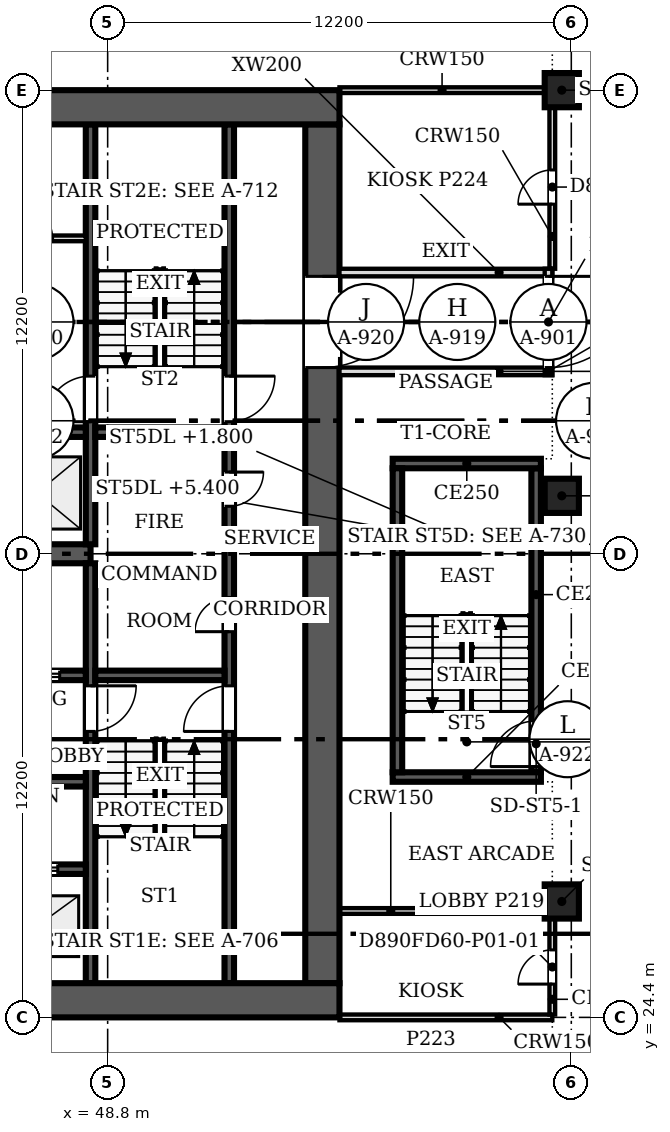
"""IFC4 building model, lengths in metres.
Left out: names, types, materials, properties, quantities, classifications, styles, units other than length and angle.
Written with IfcOpenShell. Run it as: python <this file> out.ifc"""

import sys

from ifc_helpers import new_model, si_unit, direction, frame, frame_2d, origin, origin_2d, place, context, subcontext, project, spatial, rectangle, extrude, source, transform, mapped, element, fill, save


model = new_model("IFC4")
c1 = context("Model", 3, precision=1e-05, world=origin(), true_north=direction((0.0, 1.0)))
c2 = subcontext(c1, "Body", "Model", "MODEL_VIEW")
j1 = project(units=[si_unit("LENGTHUNIT", "METRE"), si_unit("PLANEANGLEUNIT", "RADIAN")], contexts=[c1])
p1 = place(None, origin())
s1 = spatial("IfcSite", under=j1, at=p1, CompositionType="ELEMENT")
p2 = place(p1, origin())
s2 = spatial("IfcBuilding", under=s1, at=p2, CompositionType="ELEMENT")
p3 = place(p2, origin())
s3 = spatial("IfcBuildingStorey", under=s2, at=p3, CompositionType="ELEMENT", Elevation=0.0)
for number, where, z_axis, x_axis in (
    (1, (60.75, 27.45, 0.0), (0.0, 0.0, 1.0), (1.0, 0.0, 0.0)),
    (2, (60.75, 38.125, 0.0), (0.0, 0.0, 1.0), (1.0, 0.0, 0.0)),
    (3, (60.75, 48.8, 0.0), (0.0, 0.0, 1.0), (1.0, 0.0, 0.0)),
):
    element("IfcColumn", number, at=place(p3, frame(where, z_axis=z_axis, x_axis=x_axis)), inside=s3, PredefinedType="COLUMN", context=c2, shape_type="SweptSolid", body=[
        extrude(rectangle(XDim=0.9, YDim=0.9, at=origin_2d()), origin(), (0.0, 0.0, 1.0), 6.95),
    ])
for number, where, z_axis, x_axis in (
    (4, (54.9, 24.85, 0.0), (0.0, 0.0, 1.0), (-1.0, 0.0, 0.0)),
    (5, (30.5, 48.35, 0.0), (0.0, 0.0, 1.0), (1.0, 0.0, 0.0)),
):
    element("IfcWall", number, at=place(p3, frame(where, z_axis=z_axis, x_axis=x_axis)), inside=s3, PredefinedType="SHEAR", context=c2, shape_type="SweptSolid", body=[
        extrude(rectangle(XDim=24.4, YDim=0.9, at=frame_2d((12.2, 0.0))), origin(), (0.0, 0.0, 1.0), 7.2),
    ])
p4 = place(p3, frame((54.45, 47.9, 0.0), z_axis=(0.0, 0.0, 1.0), x_axis=(0.0, -1.0, 0.0)))
e6 = element("IfcWall", 6, at=p4, inside=s3, PredefinedType="SHEAR", context=c2, shape_type="SweptSolid", body=[
    extrude(rectangle(XDim=22.6, YDim=0.9, at=frame_2d((11.3, 0.0))), origin(), (0.0, 0.0, 1.0), 7.2),
])
m1 = source(origin(), c2, "Body", "SweptSolid", [
    extrude(rectangle(XDim=2.4, YDim=2.1, at=frame_2d((1.2, 1.05))), frame((0.0, 0.46, 0.0), z_axis=(0.0, -1.0, 0.0), x_axis=(1.0, 0.0, 0.0)), (0.0, 0.0, 1.0), 0.92),
])
p5 = place(p4, frame((4.0, 0.0, 0.0)))
e7 = element("IfcOpeningElement", 7, at=p5, cuts=e6, PredefinedType="OPENING", context=c2, shape_type="MappedRepresentation", body=[
    mapped(m1, transform((0.0, 0.0, 0.0), scale=1.0)),
])
p6 = place(p3, frame((31.4, 36.6, 0.0), z_axis=(0.0, 0.0, 1.0), x_axis=(1.0, 0.0, 0.0)))
e8 = element("IfcWall", 8, at=p6, inside=s3, PredefinedType="SHEAR", context=c2, shape_type="SweptSolid", body=[
    extrude(rectangle(XDim=16.95, YDim=0.5, at=frame_2d((8.475, 0.0))), origin(), (0.0, 0.0, 1.0), 7.2),
])
p7 = place(p3, frame((48.35, 36.35, 0.0), z_axis=(0.0, 0.0, 1.0), x_axis=(0.0, -1.0, 0.0)))
e9 = element("IfcWall", 9, at=p7, inside=s3, PredefinedType="SOLIDWALL", context=c2, shape_type="SweptSolid", body=[
    extrude(rectangle(XDim=11.05, YDim=0.25, at=frame_2d((5.525, 0.0))), origin(), (0.0, 0.0, 1.0), 7.2),
])
m2 = source(origin(), c2, "Body", "SweptSolid", [
    extrude(rectangle(XDim=1.2, YDim=2.1, at=frame_2d((0.6, 1.05))), frame((0.0, 0.135, 0.0), z_axis=(0.0, -1.0, 0.0), x_axis=(1.0, 0.0, 0.0)), (0.0, 0.0, 1.0), 0.27),
])
p8 = place(p7, frame((3.225, 0.0, 0.0)))
e10 = element("IfcOpeningElement", 10, at=p8, cuts=e9, PredefinedType="OPENING", context=c2, shape_type="MappedRepresentation", body=[
    mapped(m2, transform((0.0, 0.0, 0.0), scale=1.0)),
])
p9 = place(p3, frame((48.35, 47.9, 0.0), z_axis=(0.0, 0.0, 1.0), x_axis=(0.0, -1.0, 0.0)))
e11 = element("IfcWall", 11, at=p9, inside=s3, PredefinedType="SOLIDWALL", context=c2, shape_type="SweptSolid", body=[
    extrude(rectangle(XDim=11.05, YDim=0.25, at=frame_2d((5.525, 0.0))), origin(), (0.0, 0.0, 1.0), 7.2),
])
p10 = place(p9, frame((6.625, 0.0, 0.0)))
e12 = element("IfcOpeningElement", 12, at=p10, cuts=e11, PredefinedType="OPENING", context=c2, shape_type="MappedRepresentation", body=[
    mapped(m2, transform((0.0, 0.0, 0.0), scale=1.0)),
])
p11 = place(p3, frame((52.0, 25.3, 0.0), z_axis=(0.0, 0.0, 1.0), x_axis=(0.0, 1.0, 0.0)))
e13 = element("IfcWall", 13, at=p11, inside=s3, PredefinedType="SOLIDWALL", context=c2, shape_type="SweptSolid", body=[
    extrude(rectangle(XDim=22.6, YDim=0.25, at=frame_2d((11.3, 0.0))), origin(), (0.0, 0.0, 1.0), 7.2),
])
p12 = place(p11, frame((6.625, 0.0, 0.0)))
e14 = element("IfcOpeningElement", 14, at=p12, cuts=e13, PredefinedType="OPENING", context=c2, shape_type="MappedRepresentation", body=[
    mapped(m2, transform((0.0, 0.0, 0.0), scale=1.0)),
])
m3 = source(origin(), c2, "Body", "SweptSolid", [
    extrude(rectangle(XDim=0.9, YDim=2.1, at=frame_2d((0.45, 1.05))), frame((0.0, 0.135, 0.0), z_axis=(0.0, -1.0, 0.0), x_axis=(1.0, 0.0, 0.0)), (0.0, 0.0, 1.0), 0.27),
])
p13 = place(p11, frame((9.25, 0.0, 0.0)))
e15 = element("IfcOpeningElement", 15, at=p13, cuts=e13, PredefinedType="OPENING", context=c2, shape_type="MappedRepresentation", body=[
    mapped(m3, transform((0.0, 0.0, 0.0), scale=1.0)),
])
p14 = place(p11, frame((12.55, 0.0, 0.0)))
e16 = element("IfcOpeningElement", 16, at=p14, cuts=e13, PredefinedType="OPENING", context=c2, shape_type="MappedRepresentation", body=[
    mapped(m3, transform((0.0, 0.0, 0.0), scale=1.0)),
])
p15 = place(p11, frame((14.775, 0.0, 0.0)))
e17 = element("IfcOpeningElement", 17, at=p15, cuts=e13, PredefinedType="OPENING", context=c2, shape_type="MappedRepresentation", body=[
    mapped(m2, transform((0.0, 0.0, 0.0), scale=1.0)),
])
p16 = place(p3, frame((48.225, 33.4, 0.0), z_axis=(0.0, 0.0, 1.0), x_axis=(-1.0, 0.0, 0.0)))
e18 = element("IfcWall", 18, at=p16, inside=s3, PredefinedType="SOLIDWALL", context=c2, shape_type="SweptSolid", body=[
    extrude(rectangle(XDim=5.275, YDim=0.25, at=frame_2d((2.638, 0.0))), origin(), (0.0, 0.0, 1.0), 7.2),
])
p17 = place(p16, frame((3.512, 0.0, 0.0)))
e19 = element("IfcOpeningElement", 19, at=p17, cuts=e18, PredefinedType="OPENING", context=c2, shape_type="MappedRepresentation", body=[
    mapped(m2, transform((0.0, 0.0, 0.0), scale=1.0)),
])
p18 = place(p16, frame((0.688, 0.0, 0.0)))
e20 = element("IfcOpeningElement", 20, at=p18, cuts=e18, PredefinedType="OPENING", context=c2, shape_type="MappedRepresentation", body=[
    mapped(m2, transform((0.0, 0.0, 0.0), scale=1.0)),
])
p19 = place(p3, frame((48.475, 33.4, 0.0), z_axis=(0.0, 0.0, 1.0), x_axis=(1.0, 0.0, 0.0)))
e21 = element("IfcWall", 21, at=p19, inside=s3, PredefinedType="SOLIDWALL", context=c2, shape_type="SweptSolid", body=[
    extrude(rectangle(XDim=3.4, YDim=0.25, at=frame_2d((1.7, 0.0))), origin(), (0.0, 0.0, 1.0), 7.2),
])
p20 = place(p3, frame((42.95, 28.3, 0.0), z_axis=(0.0, 0.0, 1.0), x_axis=(1.0, 0.0, 0.0)))
e22 = element("IfcWall", 22, at=p20, inside=s3, PredefinedType="SOLIDWALL", context=c2, shape_type="SweptSolid", body=[
    extrude(rectangle(XDim=5.275, YDim=0.25, at=frame_2d((2.638, 0.0))), origin(), (0.0, 0.0, 1.0), 7.2),
])
m4 = source(origin(), c2, "Body", "SweptSolid", [
    extrude(rectangle(XDim=1.1, YDim=2.1, at=frame_2d((0.55, 1.05))), frame((0.0, 0.135, 0.0), z_axis=(0.0, -1.0, 0.0), x_axis=(1.0, 0.0, 0.0)), (0.0, 0.0, 1.0), 0.27),
])
p21 = place(p20, frame((0.613, 0.0, 0.0)))
e23 = element("IfcOpeningElement", 23, at=p21, cuts=e22, PredefinedType="OPENING", context=c2, shape_type="MappedRepresentation", body=[
    mapped(m4, transform((0.0, 0.0, 0.0), scale=1.0)),
])
p22 = place(p20, frame((3.438, 0.0, 0.0)))
e24 = element("IfcOpeningElement", 24, at=p22, cuts=e22, PredefinedType="OPENING", context=c2, shape_type="MappedRepresentation", body=[
    mapped(m4, transform((0.0, 0.0, 0.0), scale=1.0)),
])
p23 = place(p3, frame((42.95, 39.8, 0.0), z_axis=(0.0, 0.0, 1.0), x_axis=(1.0, 0.0, 0.0)))
e25 = element("IfcWall", 25, at=p23, inside=s3, PredefinedType="SOLIDWALL", context=c2, shape_type="SweptSolid", body=[
    extrude(rectangle(XDim=5.275, YDim=0.25, at=frame_2d((2.638, 0.0))), origin(), (0.0, 0.0, 1.0), 7.2),
])
p24 = place(p23, frame((0.613, 0.0, 0.0)))
e26 = element("IfcOpeningElement", 26, at=p24, cuts=e25, PredefinedType="OPENING", context=c2, shape_type="MappedRepresentation", body=[
    mapped(m4, transform((0.0, 0.0, 0.0), scale=1.0)),
])
p25 = place(p23, frame((3.438, 0.0, 0.0)))
e27 = element("IfcOpeningElement", 27, at=p25, cuts=e25, PredefinedType="OPENING", context=c2, shape_type="MappedRepresentation", body=[
    mapped(m4, transform((0.0, 0.0, 0.0), scale=1.0)),
])
p26 = place(p3, frame((48.475, 39.8, 0.0), z_axis=(0.0, 0.0, 1.0), x_axis=(1.0, 0.0, 0.0)))
e28 = element("IfcWall", 28, at=p26, inside=s3, PredefinedType="SOLIDWALL", context=c2, shape_type="SweptSolid", body=[
    extrude(rectangle(XDim=3.4, YDim=0.25, at=frame_2d((1.7, 0.0))), origin(), (0.0, 0.0, 1.0), 7.2),
])
p27 = place(p3, frame((42.95, 30.6, 0.0), z_axis=(0.0, 0.0, 1.0), x_axis=(1.0, 0.0, 0.0)))
e29 = element("IfcWall", 29, at=p27, inside=s3, PredefinedType="SOLIDWALL", context=c2, shape_type="SweptSolid", body=[
    extrude(rectangle(XDim=5.275, YDim=0.25, at=frame_2d((2.638, 0.0))), origin(), (0.0, 0.0, 1.0), 7.2),
])
p28 = place(p3, frame((45.65, 44.9, 0.0), z_axis=(0.0, 0.0, 1.0), x_axis=(1.0, 0.0, 0.0)))
e30 = element("IfcWall", 30, at=p28, inside=s3, PredefinedType="PARTITIONING", context=c2, shape_type="SweptSolid", body=[
    extrude(rectangle(XDim=2.575, YDim=0.15, at=frame_2d((1.288, 0.0))), origin(), (0.0, 0.0, 1.0), 6.95),
])
m5 = source(origin(), c2, "Body", "SweptSolid", [
    extrude(rectangle(XDim=0.9, YDim=2.1, at=frame_2d((0.45, 1.05))), frame((0.0, 0.085, 0.0), z_axis=(0.0, -1.0, 0.0), x_axis=(1.0, 0.0, 0.0)), (0.0, 0.0, 1.0), 0.17),
])
p29 = place(p28, frame((0.8, 0.0, 0.0)))
e31 = element("IfcOpeningElement", 31, at=p29, cuts=e30, PredefinedType="OPENING", context=c2, shape_type="MappedRepresentation", body=[
    mapped(m5, transform((0.0, 0.0, 0.0), scale=1.0)),
])
p30 = place(p3, frame((60.2, 30.725, 0.0), z_axis=(0.0, 0.0, 1.0), x_axis=(-1.0, 0.0, 0.0)))
e32 = element("IfcWall", 32, at=p30, inside=s3, PredefinedType="SOLIDWALL", context=c2, shape_type="SweptSolid", body=[
    extrude(rectangle(XDim=3.9, YDim=0.25, at=frame_2d((1.95, 0.0))), origin(), (0.0, 0.0, 1.0), 7.2),
])
p31 = place(p3, frame((56.425, 30.85, 0.0), z_axis=(0.0, 0.0, 1.0), x_axis=(0.0, 1.0, 0.0)))
e33 = element("IfcWall", 33, at=p31, inside=s3, PredefinedType="SOLIDWALL", context=c2, shape_type="SweptSolid", body=[
    extrude(rectangle(XDim=8.0, YDim=0.25, at=frame_2d((4.0, 0.0))), origin(), (0.0, 0.0, 1.0), 7.2),
])
p32 = place(p3, frame((56.3, 38.975, 0.0), z_axis=(0.0, 0.0, 1.0), x_axis=(1.0, 0.0, 0.0)))
e34 = element("IfcWall", 34, at=p32, inside=s3, PredefinedType="SOLIDWALL", context=c2, shape_type="SweptSolid", body=[
    extrude(rectangle(XDim=3.9, YDim=0.25, at=frame_2d((1.95, 0.0))), origin(), (0.0, 0.0, 1.0), 7.2),
])
p33 = place(p3, frame((60.075, 38.85, 0.0), z_axis=(0.0, 0.0, 1.0), x_axis=(0.0, -1.0, 0.0)))
e35 = element("IfcWall", 35, at=p33, inside=s3, PredefinedType="SOLIDWALL", context=c2, shape_type="SweptSolid", body=[
    extrude(rectangle(XDim=8.0, YDim=0.25, at=frame_2d((4.0, 0.0))), origin(), (0.0, 0.0, 1.0), 7.2),
])
p34 = place(p33, frame((6.65, 0.0, 0.0)))
e36 = element("IfcOpeningElement", 36, at=p34, cuts=e35, PredefinedType="OPENING", context=c2, shape_type="MappedRepresentation", body=[
    mapped(m2, transform((0.0, 0.0, 0.0), scale=1.0)),
])
for number, where, z_axis, x_axis in (
    (37, (54.9, 41.4, 0.0), (0.0, 0.0, 1.0), (1.0, 0.0, 0.0)),
    (38, (54.9, 44.0, 0.0), (0.0, 0.0, 1.0), (1.0, 0.0, 0.0)),
):
    element("IfcWall", number, at=place(p3, frame(where, z_axis=z_axis, x_axis=x_axis)), inside=s3, PredefinedType="PARTITIONING", context=c2, shape_type="SweptSolid", body=[
        extrude(rectangle(XDim=5.6, YDim=0.2, at=frame_2d((2.8, 0.0))), origin(), (0.0, 0.0, 1.0), 6.115),
    ])
p35 = place(p3, frame((60.4, 44.1, 0.0), z_axis=(0.0, 0.0, 1.0), x_axis=(0.0, -1.0, 0.0)))
e39 = element("IfcWall", 39, at=p35, inside=s3, PredefinedType="PARTITIONING", context=c2, shape_type="SweptSolid", body=[
    extrude(rectangle(XDim=2.8, YDim=0.2, at=frame_2d((1.4, 0.0))), origin(), (0.0, 0.0, 1.0), 6.115),
])
m6 = source(origin(), c2, "Body", "SweptSolid", [
    extrude(rectangle(XDim=2.4, YDim=2.1, at=frame_2d((1.2, 1.05))), frame((0.0, 0.11, 0.0), z_axis=(0.0, -1.0, 0.0), x_axis=(1.0, 0.0, 0.0)), (0.0, 0.0, 1.0), 0.22),
])
p36 = place(p35, frame((0.2, 0.0, 0.0)))
e40 = element("IfcOpeningElement", 40, at=p36, cuts=e39, PredefinedType="OPENING", context=c2, shape_type="MappedRepresentation", body=[
    mapped(m6, transform((0.0, 0.0, 0.0), scale=1.0)),
])
p37 = place(p3, frame((54.9, 24.4, 0.0), z_axis=(0.0, 0.0, 1.0), x_axis=(1.0, 0.0, 0.0)))
e41 = element("IfcWall", 41, at=p37, inside=s3, PredefinedType="PARTITIONING", context=c2, shape_type="SweptSolid", body=[
    extrude(rectangle(XDim=5.6, YDim=0.15, at=frame_2d((2.8, 0.0))), origin(), (0.0, 0.0, 1.0), 6.115),
])
p38 = place(p3, frame((60.5, 24.476, 0.0), z_axis=(0.0, 0.0, 1.0), x_axis=(0.0, 1.0, 0.0)))
e42 = element("IfcWall", 42, at=p38, inside=s3, PredefinedType="PARTITIONING", context=c2, shape_type="SweptSolid", body=[
    extrude(rectangle(XDim=2.523, YDim=0.15, at=frame_2d((1.261, 0.0))), origin(), (0.0, 0.0, 1.0), 6.115),
])
p39 = place(p38, frame((0.8, 0.0, 0.0)))
e43 = element("IfcOpeningElement", 43, at=p39, cuts=e42, PredefinedType="OPENING", context=c2, shape_type="MappedRepresentation", body=[
    mapped(m5, transform((0.0, 0.0, 0.0), scale=1.0)),
])
p40 = place(p3, frame((54.9, 27.2, 0.0), z_axis=(0.0, 0.0, 1.0), x_axis=(1.0, 0.0, 0.0)))
e44 = element("IfcWall", 44, at=p40, inside=s3, PredefinedType="PARTITIONING", context=c2, shape_type="SweptSolid", body=[
    extrude(rectangle(XDim=5.399, YDim=0.15, at=frame_2d((2.7, 0.0))), origin(), (0.0, 0.0, 1.0), 6.115),
])
p41 = place(p3, frame((60.5, 44.1, 0.0), z_axis=(0.0, 0.0, 1.0), x_axis=(0.0, 1.0, 0.0)))
e45 = element("IfcWall", 45, at=p41, inside=s3, PredefinedType="PARTITIONING", context=c2, shape_type="SweptSolid", body=[
    extrude(rectangle(XDim=4.249, YDim=0.15, at=frame_2d((2.125, 0.0))), origin(), (0.0, 0.0, 1.0), 6.115),
])
p42 = place(p41, frame((1.7, 0.0, 0.0)))
e46 = element("IfcOpeningElement", 46, at=p42, cuts=e45, PredefinedType="OPENING", context=c2, shape_type="MappedRepresentation", body=[
    mapped(m5, transform((0.0, 0.0, 0.0), scale=1.0)),
])
p43 = place(p3, frame((54.9, 48.8, 0.0), z_axis=(0.0, 0.0, 1.0), x_axis=(1.0, 0.0, 0.0)))
e47 = element("IfcWall", 47, at=p43, inside=s3, PredefinedType="PARTITIONING", context=c2, shape_type="SweptSolid", body=[
    extrude(rectangle(XDim=5.399, YDim=0.15, at=frame_2d((2.7, 0.0))), origin(), (0.0, 0.0, 1.0), 6.115),
])
m7 = source(origin(), c2, "Body", "SweptSolid", [
    extrude(rectangle(XDim=2.4, YDim=2.1, at=frame_2d((1.2, 1.05))), frame((0.0, 0.025, 0.0), z_axis=(0.0, -1.0, 0.0), x_axis=(1.0, 0.0, 0.0)), (0.0, 0.0, 1.0), 0.05),
])
p44 = place(p5, origin())
e48 = element("IfcDoor", 48, at=p44, inside=s3, OperationType="SINGLE_SWING_LEFT", PredefinedType="DOOR", context=c2, shape_type="MappedRepresentation", body=[
    mapped(m7, transform((0.0, 0.0, 0.0), scale=1.0)),
])
fill(e7, e48)
m8 = source(origin(), c2, "Body", "SweptSolid", [
    extrude(rectangle(XDim=1.2, YDim=2.1, at=frame_2d((0.6, 1.05))), frame((0.0, 0.025, 0.0), z_axis=(0.0, -1.0, 0.0), x_axis=(1.0, 0.0, 0.0)), (0.0, 0.0, 1.0), 0.05),
])
p45 = place(p8, origin())
e49 = element("IfcDoor", 49, at=p45, inside=s3, OperationType="SINGLE_SWING_LEFT", PredefinedType="DOOR", context=c2, shape_type="MappedRepresentation", body=[
    mapped(m8, transform((0.0, 0.0, 0.0), scale=1.0)),
])
fill(e10, e49)
p46 = place(p10, origin())
e50 = element("IfcDoor", 50, at=p46, inside=s3, OperationType="SINGLE_SWING_RIGHT", PredefinedType="DOOR", context=c2, shape_type="MappedRepresentation", body=[
    mapped(m8, transform((0.0, 0.0, 0.0), scale=1.0)),
])
fill(e12, e50)
p47 = place(p12, origin())
e51 = element("IfcDoor", 51, at=p47, inside=s3, OperationType="SINGLE_SWING_LEFT", PredefinedType="DOOR", context=c2, shape_type="MappedRepresentation", body=[
    mapped(m8, transform((0.0, 0.0, 0.0), scale=1.0)),
])
fill(e14, e51)
m9 = source(origin(), c2, "Body", "SweptSolid", [
    extrude(rectangle(XDim=0.9, YDim=2.1, at=frame_2d((0.45, 1.05))), frame((0.0, 0.025, 0.0), z_axis=(0.0, -1.0, 0.0), x_axis=(1.0, 0.0, 0.0)), (0.0, 0.0, 1.0), 0.05),
])
p48 = place(p13, origin())
e52 = element("IfcDoor", 52, at=p48, inside=s3, OperationType="SINGLE_SWING_LEFT", PredefinedType="DOOR", context=c2, shape_type="MappedRepresentation", body=[
    mapped(m9, transform((0.0, 0.0, 0.0), scale=1.0)),
])
fill(e15, e52)
p49 = place(p14, origin())
e53 = element("IfcDoor", 53, at=p49, inside=s3, OperationType="SINGLE_SWING_RIGHT", PredefinedType="DOOR", context=c2, shape_type="MappedRepresentation", body=[
    mapped(m9, transform((0.0, 0.0, 0.0), scale=1.0)),
])
fill(e16, e53)
p50 = place(p15, origin())
e54 = element("IfcDoor", 54, at=p50, inside=s3, OperationType="SINGLE_SWING_RIGHT", PredefinedType="DOOR", context=c2, shape_type="MappedRepresentation", body=[
    mapped(m8, transform((0.0, 0.0, 0.0), scale=1.0)),
])
fill(e17, e54)
p51 = place(p18, origin())
e55 = element("IfcDoor", 55, at=p51, inside=s3, OperationType="DOUBLE_DOOR_SLIDING", PredefinedType="DOOR", context=c2, shape_type="MappedRepresentation", body=[
    mapped(m8, transform((0.0, 0.0, 0.0), scale=1.0)),
])
fill(e20, e55)
m10 = source(origin(), c2, "Body", "SweptSolid", [
    extrude(rectangle(XDim=1.1, YDim=2.1, at=frame_2d((0.55, 1.05))), frame((0.0, 0.025, 0.0), z_axis=(0.0, -1.0, 0.0), x_axis=(1.0, 0.0, 0.0)), (0.0, 0.0, 1.0), 0.05),
])
p52 = place(p22, origin())
e56 = element("IfcDoor", 56, at=p52, inside=s3, OperationType="DOUBLE_DOOR_SLIDING", PredefinedType="DOOR", context=c2, shape_type="MappedRepresentation", body=[
    mapped(m10, transform((0.0, 0.0, 0.0), scale=1.0)),
])
fill(e24, e56)
p53 = place(p25, origin())
e57 = element("IfcDoor", 57, at=p53, inside=s3, OperationType="DOUBLE_DOOR_SLIDING", PredefinedType="DOOR", context=c2, shape_type="MappedRepresentation", body=[
    mapped(m10, transform((0.0, 0.0, 0.0), scale=1.0)),
])
fill(e27, e57)
p54 = place(p34, origin())
e58 = element("IfcDoor", 58, at=p54, inside=s3, OperationType="SINGLE_SWING_RIGHT", PredefinedType="DOOR", context=c2, shape_type="MappedRepresentation", body=[
    mapped(m8, transform((0.0, 0.0, 0.0), scale=1.0)),
])
fill(e36, e58)
p55 = place(p36, origin())
e59 = element("IfcDoor", 59, at=p55, inside=s3, OperationType="DOUBLE_DOOR_SINGLE_SWING", PredefinedType="DOOR", context=c2, shape_type="MappedRepresentation", body=[
    mapped(m7, transform((0.0, 0.0, 0.0), scale=1.0)),
])
fill(e40, e59)
p56 = place(p39, origin())
e60 = element("IfcDoor", 60, at=p56, inside=s3, OperationType="SINGLE_SWING_LEFT", PredefinedType="DOOR", context=c2, shape_type="MappedRepresentation", body=[
    mapped(m9, transform((0.0, 0.0, 0.0), scale=1.0)),
])
fill(e43, e60)
p57 = place(p42, origin())
e61 = element("IfcDoor", 61, at=p57, inside=s3, OperationType="SINGLE_SWING_LEFT", PredefinedType="DOOR", context=c2, shape_type="MappedRepresentation", body=[
    mapped(m9, transform((0.0, 0.0, 0.0), scale=1.0)),
])
fill(e46, e61)
save(model, sys.argv[1])
